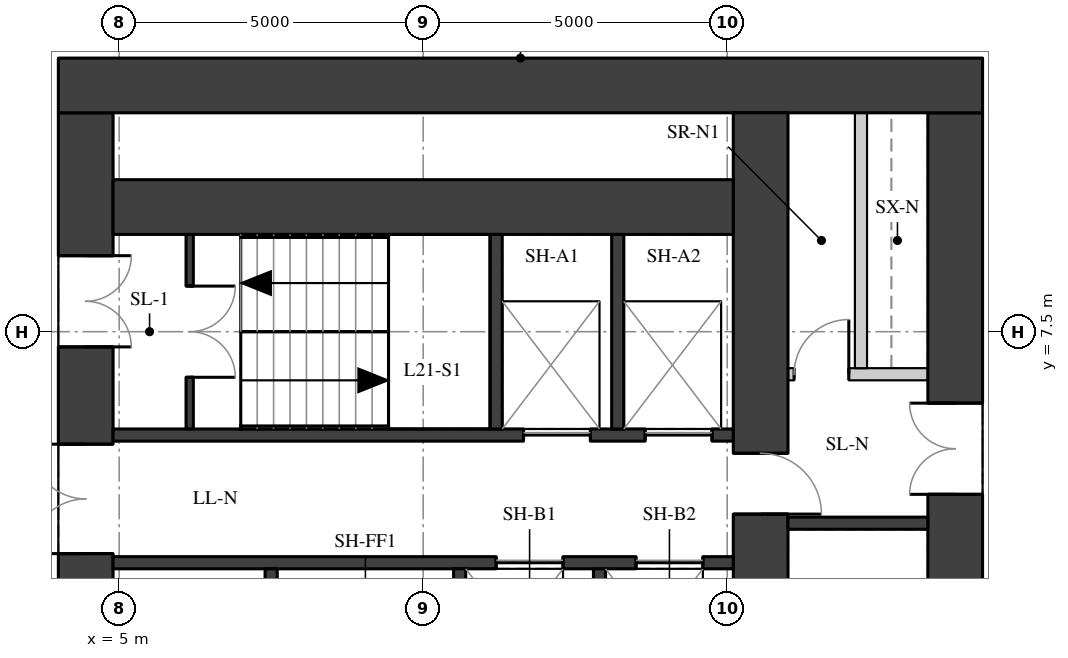
"""IFC4 building model, lengths in metres.
Left out: names, types, materials, properties, quantities, classifications, styles, units other than length and angle.
Written with IfcOpenShell. Run it as: python <this file> out.ifc"""

import sys

from ifc_helpers import new_model, si_unit, direction, frame, frame_2d, origin, place, context, subcontext, project, spatial, rectangle, extrude, element, fill, save


model = new_model("IFC4")
c1 = context("Model", 3, precision=1e-05, world=origin(), true_north=direction((0.0, 1.0)))
c2 = subcontext(c1, "Body", "Model", "MODEL_VIEW")
j1 = project(units=[si_unit("LENGTHUNIT", "METRE"), si_unit("PLANEANGLEUNIT", "RADIAN")], contexts=[c1])
p1 = place(None, origin())
s1 = spatial("IfcSite", under=j1, at=p1, CompositionType="ELEMENT")
p2 = place(p1, origin())
s2 = spatial("IfcBuilding", under=s1, at=p2, CompositionType="ELEMENT")
p3 = place(p2, frame((0.0, 0.0, 77.8)))
s3 = spatial("IfcBuildingStorey", under=s2, at=p3, CompositionType="ELEMENT", Elevation=77.8)
p4 = place(p3, frame((4.45, -11.1, 0.0), z_axis=(0.0, 0.0, 1.0), x_axis=(0.0, 1.0, 0.0)))
e1 = element("IfcWall", 1, at=p4, inside=s3, PredefinedType="SHEAR", context=c2, shape_type="SweptSolid", body=[
    extrude(rectangle(XDim=22.2, YDim=0.9, at=frame_2d((11.1, 0.0))), origin(), (0.0, 0.0, 1.0), 3.02),
])
p5 = place(p4, frame((2.35, 0.0, 0.0)))
e2 = element("IfcOpeningElement", 2, at=p5, cuts=e1, PredefinedType="OPENING", context=c2, shape_type="SweptSolid", body=[
    extrude(rectangle(XDim=1.5, YDim=2.1, at=frame_2d((0.75, 1.05))), frame((0.0, 0.46, 0.0), z_axis=(0.0, -1.0, 0.0), x_axis=(1.0, 0.0, 0.0)), (0.0, 0.0, 1.0), 0.92),
])
p6 = place(p4, frame((5.45, 0.0, 0.0)))
e3 = element("IfcOpeningElement", 3, at=p6, cuts=e1, PredefinedType="OPENING", context=c2, shape_type="SweptSolid", body=[
    extrude(rectangle(XDim=1.8, YDim=2.1, at=frame_2d((0.9, 1.05))), frame((0.0, 0.46, 0.0), z_axis=(0.0, -1.0, 0.0), x_axis=(1.0, 0.0, 0.0)), (0.0, 0.0, 1.0), 0.92),
])
p7 = place(p4, frame((7.95, 0.0, 0.0)))
e4 = element("IfcOpeningElement", 4, at=p7, cuts=e1, PredefinedType="OPENING", context=c2, shape_type="SweptSolid", body=[
    extrude(rectangle(XDim=1.1, YDim=2.1, at=frame_2d((0.55, 1.05))), frame((0.0, 0.46, 0.0), z_axis=(0.0, -1.0, 0.0), x_axis=(1.0, 0.0, 0.0)), (0.0, 0.0, 1.0), 0.92),
])
p8 = place(p4, frame((10.6, 0.0, 0.0)))
e5 = element("IfcOpeningElement", 5, at=p8, cuts=e1, PredefinedType="OPENING", context=c2, shape_type="SweptSolid", body=[
    extrude(rectangle(XDim=1.0, YDim=2.1, at=frame_2d((0.5, 1.05))), frame((0.0, 0.46, 0.0), z_axis=(0.0, -1.0, 0.0), x_axis=(1.0, 0.0, 0.0)), (0.0, 0.0, 1.0), 0.92),
])
p9 = place(p4, frame((13.15, 0.0, 0.0)))
e6 = element("IfcOpeningElement", 6, at=p9, cuts=e1, PredefinedType="OPENING", context=c2, shape_type="SweptSolid", body=[
    extrude(rectangle(XDim=1.1, YDim=2.1, at=frame_2d((0.55, 1.05))), frame((0.0, 0.46, 0.0), z_axis=(0.0, -1.0, 0.0), x_axis=(1.0, 0.0, 0.0)), (0.0, 0.0, 1.0), 0.92),
])
p10 = place(p4, frame((14.95, 0.0, 0.0)))
e7 = element("IfcOpeningElement", 7, at=p10, cuts=e1, PredefinedType="OPENING", context=c2, shape_type="SweptSolid", body=[
    extrude(rectangle(XDim=1.8, YDim=2.1, at=frame_2d((0.9, 1.05))), frame((0.0, 0.46, 0.0), z_axis=(0.0, -1.0, 0.0), x_axis=(1.0, 0.0, 0.0)), (0.0, 0.0, 1.0), 0.92),
])
p11 = place(p4, frame((18.35, 0.0, 0.0)))
e8 = element("IfcOpeningElement", 8, at=p11, cuts=e1, PredefinedType="OPENING", context=c2, shape_type="SweptSolid", body=[
    extrude(rectangle(XDim=1.5, YDim=2.1, at=frame_2d((0.75, 1.05))), frame((0.0, 0.46, 0.0), z_axis=(0.0, -1.0, 0.0), x_axis=(1.0, 0.0, 0.0)), (0.0, 0.0, 1.0), 0.92),
])
p12 = place(p3, frame((18.75, -11.1, 0.0), z_axis=(0.0, 0.0, 1.0), x_axis=(0.0, 1.0, 0.0)))
e9 = element("IfcWall", 9, at=p12, inside=s3, PredefinedType="SHEAR", context=c2, shape_type="SweptSolid", body=[
    extrude(rectangle(XDim=22.2, YDim=0.9, at=frame_2d((11.1, 0.0))), origin(), (0.0, 0.0, 1.0), 3.02),
])
p13 = place(p12, frame((15.925, 0.0, 0.0)))
e10 = element("IfcOpeningElement", 10, at=p13, cuts=e9, PredefinedType="OPENING", context=c2, shape_type="SweptSolid", body=[
    extrude(rectangle(XDim=1.5, YDim=2.1, at=frame_2d((0.75, 1.05))), frame((0.0, 0.46, 0.0), z_axis=(0.0, -1.0, 0.0), x_axis=(1.0, 0.0, 0.0)), (0.0, 0.0, 1.0), 0.92),
])
p14 = place(p12, frame((4.525, 0.0, 0.0)))
e11 = element("IfcOpeningElement", 11, at=p14, cuts=e9, PredefinedType="OPENING", context=c2, shape_type="SweptSolid", body=[
    extrude(rectangle(XDim=1.5, YDim=2.1, at=frame_2d((0.75, 1.05))), frame((0.0, 0.46, 0.0), z_axis=(0.0, -1.0, 0.0), x_axis=(1.0, 0.0, 0.0)), (0.0, 0.0, 1.0), 0.92),
])
p15 = place(p3, frame((4.0, 11.55, 0.0), z_axis=(0.0, 0.0, 1.0), x_axis=(1.0, 0.0, 0.0)))
e12 = element("IfcWall", 12, at=p15, inside=s3, PredefinedType="SHEAR", context=c2, shape_type="SweptSolid", body=[
    extrude(rectangle(XDim=15.2, YDim=0.9, at=frame_2d((7.6, 0.0))), origin(), (0.0, 0.0, 1.0), 3.02),
])
p16 = place(p3, frame((15.55, -11.1, 0.0), z_axis=(0.0, 0.0, 1.0), x_axis=(0.0, 1.0, 0.0)))
e13 = element("IfcWall", 13, at=p16, inside=s3, PredefinedType="SHEAR", context=c2, shape_type="SweptSolid", body=[
    extrude(rectangle(XDim=22.2, YDim=0.9, at=frame_2d((11.1, 0.0))), origin(), (0.0, 0.0, 1.0), 3.02),
])
p17 = place(p16, frame((15.6, 0.0, 0.0)))
e14 = element("IfcOpeningElement", 14, at=p17, cuts=e13, PredefinedType="OPENING", context=c2, shape_type="SweptSolid", body=[
    extrude(rectangle(XDim=1.0, YDim=2.1, at=frame_2d((0.5, 1.05))), frame((0.0, 0.46, 0.0), z_axis=(0.0, -1.0, 0.0), x_axis=(1.0, 0.0, 0.0)), (0.0, 0.0, 1.0), 0.92),
])
p18 = place(p16, frame((5.6, 0.0, 0.0)))
e15 = element("IfcOpeningElement", 15, at=p18, cuts=e13, PredefinedType="OPENING", context=c2, shape_type="SweptSolid", body=[
    extrude(rectangle(XDim=1.0, YDim=2.1, at=frame_2d((0.5, 1.05))), frame((0.0, 0.46, 0.0), z_axis=(0.0, -1.0, 0.0), x_axis=(1.0, 0.0, 0.0)), (0.0, 0.0, 1.0), 0.92),
])
p19 = place(p3, frame((4.9, 9.55, 0.0), z_axis=(0.0, 0.0, 1.0), x_axis=(1.0, 0.0, 0.0)))
e16 = element("IfcWall", 16, at=p19, inside=s3, PredefinedType="SHEAR", context=c2, shape_type="SweptSolid", body=[
    extrude(rectangle(XDim=10.2, YDim=0.9, at=frame_2d((5.1, 0.0))), origin(), (0.0, 0.0, 1.0), 3.02),
])
p20 = place(p3, frame((4.9, 5.8, 0.0), z_axis=(0.0, 0.0, 1.0), x_axis=(1.0, 0.0, 0.0)))
e17 = element("IfcWall", 17, at=p20, inside=s3, PredefinedType="SHEAR", context=c2, shape_type="SweptSolid", body=[
    extrude(rectangle(XDim=10.2, YDim=0.2, at=frame_2d((5.1, 0.0))), origin(), (0.0, 0.0, 1.0), 3.02),
])
p21 = place(p20, frame((6.75, 0.0, 0.0)))
e18 = element("IfcOpeningElement", 18, at=p21, cuts=e17, PredefinedType="OPENING", context=c2, shape_type="SweptSolid", body=[
    extrude(rectangle(XDim=1.1, YDim=2.1, at=frame_2d((0.55, 1.05))), frame((0.0, 0.11, 0.0), z_axis=(0.0, -1.0, 0.0), x_axis=(1.0, 0.0, 0.0)), (0.0, 0.0, 1.0), 0.22),
])
p22 = place(p20, frame((8.75, 0.0, 0.0)))
e19 = element("IfcOpeningElement", 19, at=p22, cuts=e17, PredefinedType="OPENING", context=c2, shape_type="SweptSolid", body=[
    extrude(rectangle(XDim=1.1, YDim=2.1, at=frame_2d((0.55, 1.05))), frame((0.0, 0.11, 0.0), z_axis=(0.0, -1.0, 0.0), x_axis=(1.0, 0.0, 0.0)), (0.0, 0.0, 1.0), 0.22),
])
p23 = place(p3, frame((4.9, 3.7, 0.0), z_axis=(0.0, 0.0, 1.0), x_axis=(1.0, 0.0, 0.0)))
e20 = element("IfcWall", 20, at=p23, inside=s3, PredefinedType="SHEAR", context=c2, shape_type="SweptSolid", body=[
    extrude(rectangle(XDim=10.2, YDim=0.2, at=frame_2d((5.1, 0.0))), origin(), (0.0, 0.0, 1.0), 3.02),
])
p24 = place(p23, frame((6.3, 0.0, 0.0)))
e21 = element("IfcOpeningElement", 21, at=p24, cuts=e20, PredefinedType="OPENING", context=c2, shape_type="SweptSolid", body=[
    extrude(rectangle(XDim=1.1, YDim=2.1, at=frame_2d((0.55, 1.05))), frame((0.0, 0.11, 0.0), z_axis=(0.0, -1.0, 0.0), x_axis=(1.0, 0.0, 0.0)), (0.0, 0.0, 1.0), 0.22),
])
p25 = place(p23, frame((8.6, 0.0, 0.0)))
e22 = element("IfcOpeningElement", 22, at=p25, cuts=e20, PredefinedType="OPENING", context=c2, shape_type="SweptSolid", body=[
    extrude(rectangle(XDim=1.1, YDim=2.1, at=frame_2d((0.55, 1.05))), frame((0.0, 0.11, 0.0), z_axis=(0.0, -1.0, 0.0), x_axis=(1.0, 0.0, 0.0)), (0.0, 0.0, 1.0), 0.22),
])
for number, where, z_axis, x_axis in (
    (23, (11.2, 5.9, 0.0), (0.0, 0.0, 1.0), (0.0, 1.0, 0.0)),
    (24, (13.2, 5.9, 0.0), (0.0, 0.0, 1.0), (0.0, 1.0, 0.0)),
):
    element("IfcWall", number, at=place(p3, frame(where, z_axis=z_axis, x_axis=x_axis)), inside=s3, PredefinedType="SHEAR", context=c2, shape_type="SweptSolid", body=[
        extrude(rectangle(XDim=3.2, YDim=0.2, at=frame_2d((1.6, 0.0))), origin(), (0.0, 0.0, 1.0), 3.02),
    ])
p26 = place(p3, frame((7.5, 1.1, 0.0), z_axis=(0.0, 0.0, 1.0), x_axis=(0.0, 1.0, 0.0)))
e25 = element("IfcWall", 25, at=p26, inside=s3, PredefinedType="SHEAR", context=c2, shape_type="SweptSolid", body=[
    extrude(rectangle(XDim=2.5, YDim=0.2, at=frame_2d((1.25, 0.0))), origin(), (0.0, 0.0, 1.0), 3.02),
])
p27 = place(p26, frame((0.7, 0.0, 0.0)))
e26 = element("IfcOpeningElement", 26, at=p27, cuts=e25, PredefinedType="OPENING", context=c2, shape_type="SweptSolid", body=[
    extrude(rectangle(XDim=1.1, YDim=2.1, at=frame_2d((0.55, 1.05))), frame((0.0, 0.11, 0.0), z_axis=(0.0, -1.0, 0.0), x_axis=(1.0, 0.0, 0.0)), (0.0, 0.0, 1.0), 0.22),
])
for number, where, z_axis, x_axis in (
    (27, (10.6, 1.1, 0.0), (0.0, 0.0, 1.0), (0.0, 1.0, 0.0)),
    (28, (12.9, 1.1, 0.0), (0.0, 0.0, 1.0), (0.0, 1.0, 0.0)),
):
    element("IfcWall", number, at=place(p3, frame(where, z_axis=z_axis, x_axis=x_axis)), inside=s3, PredefinedType="SHEAR", context=c2, shape_type="SweptSolid", body=[
        extrude(rectangle(XDim=2.5, YDim=0.2, at=frame_2d((1.25, 0.0))), origin(), (0.0, 0.0, 1.0), 3.02),
    ])
p28 = place(p3, frame((6.16, 5.9, 0.0), z_axis=(0.0, 0.0, 1.0), x_axis=(0.0, 1.0, 0.0)))
e29 = element("IfcWall", 29, at=p28, inside=s3, PredefinedType="SHEAR", context=c2, shape_type="SweptSolid", body=[
    extrude(rectangle(XDim=3.2, YDim=0.12, at=frame_2d((1.6, 0.0))), origin(), (0.0, 0.0, 1.0), 3.02),
])
p29 = place(p28, frame((0.85, 0.0, 0.0)))
e30 = element("IfcOpeningElement", 30, at=p29, cuts=e29, PredefinedType="OPENING", context=c2, shape_type="SweptSolid", body=[
    extrude(rectangle(XDim=1.5, YDim=2.1, at=frame_2d((0.75, 1.05))), frame((0.0, 0.07, 0.0), z_axis=(0.0, -1.0, 0.0), x_axis=(1.0, 0.0, 0.0)), (0.0, 0.0, 1.0), 0.14),
])
p30 = place(p3, frame((16.0, 4.35, 0.0), z_axis=(0.0, 0.0, 1.0), x_axis=(1.0, 0.0, 0.0)))
e31 = element("IfcWall", 31, at=p30, inside=s3, PredefinedType="SHEAR", context=c2, shape_type="SweptSolid", body=[
    extrude(rectangle(XDim=2.3, YDim=0.2, at=frame_2d((1.15, 0.0))), origin(), (0.0, 0.0, 1.0), 3.02),
])
p31 = place(p3, frame((16.0, 6.8, 0.0), z_axis=(0.0, 0.0, 1.0), x_axis=(1.0, 0.0, 0.0)))
e32 = element("IfcWall", 32, at=p31, inside=s3, PredefinedType="PARTITIONING", context=c2, shape_type="SweptSolid", body=[
    extrude(rectangle(XDim=2.3, YDim=0.2, at=frame_2d((1.15, 0.0))), origin(), (0.0, 0.0, 1.0), 3.02),
])
p32 = place(p31, frame((0.1, 0.0, 0.0)))
e33 = element("IfcOpeningElement", 33, at=p32, cuts=e32, PredefinedType="OPENING", context=c2, shape_type="SweptSolid", body=[
    extrude(rectangle(XDim=0.9, YDim=2.1, at=frame_2d((0.45, 1.05))), frame((0.0, 0.11, 0.0), z_axis=(0.0, -1.0, 0.0), x_axis=(1.0, 0.0, 0.0)), (0.0, 0.0, 1.0), 0.22),
])
p33 = place(p3, frame((17.2, 6.9, 0.0), z_axis=(0.0, 0.0, 1.0), x_axis=(0.0, 1.0, 0.0)))
e34 = element("IfcWall", 34, at=p33, inside=s3, PredefinedType="PARTITIONING", context=c2, shape_type="SweptSolid", body=[
    extrude(rectangle(XDim=4.2, YDim=0.2, at=frame_2d((2.1, 0.0))), origin(), (0.0, 0.0, 1.0), 3.02),
])
p34 = place(p10, origin())
e35 = element("IfcDoor", 35, at=p34, inside=s3, OperationType="DOUBLE_DOOR_SINGLE_SWING", PredefinedType="DOOR", context=c2, shape_type="SweptSolid", body=[
    extrude(rectangle(XDim=1.8, YDim=2.1, at=frame_2d((0.9, 1.05))), frame((0.0, 0.025, 0.0), z_axis=(0.0, -1.0, 0.0), x_axis=(1.0, 0.0, 0.0)), (0.0, 0.0, 1.0), 0.05),
])
fill(e7, e35)
p35 = place(p11, origin())
e36 = element("IfcDoor", 36, at=p35, inside=s3, OperationType="DOUBLE_DOOR_SINGLE_SWING", PredefinedType="DOOR", context=c2, shape_type="SweptSolid", body=[
    extrude(rectangle(XDim=1.5, YDim=2.1, at=frame_2d((0.75, 1.05))), frame((0.0, 0.025, 0.0), z_axis=(0.0, -1.0, 0.0), x_axis=(1.0, 0.0, 0.0)), (0.0, 0.0, 1.0), 0.05),
])
fill(e8, e36)
p36 = place(p13, origin())
e37 = element("IfcDoor", 37, at=p36, inside=s3, OperationType="DOUBLE_DOOR_SINGLE_SWING", PredefinedType="DOOR", context=c2, shape_type="SweptSolid", body=[
    extrude(rectangle(XDim=1.5, YDim=2.1, at=frame_2d((0.75, 1.05))), frame((0.0, 0.025, 0.0), z_axis=(0.0, -1.0, 0.0), x_axis=(1.0, 0.0, 0.0)), (0.0, 0.0, 1.0), 0.05),
])
fill(e10, e37)
p37 = place(p29, origin())
e38 = element("IfcDoor", 38, at=p37, inside=s3, OperationType="DOUBLE_DOOR_SINGLE_SWING", PredefinedType="DOOR", context=c2, shape_type="SweptSolid", body=[
    extrude(rectangle(XDim=1.5, YDim=2.1, at=frame_2d((0.75, 1.05))), frame((0.0, 0.025, 0.0), z_axis=(0.0, -1.0, 0.0), x_axis=(1.0, 0.0, 0.0)), (0.0, 0.0, 1.0), 0.05),
])
fill(e30, e38)
p38 = place(p21, origin())
e39 = element("IfcDoor", 39, at=p38, inside=s3, OperationType="DOUBLE_DOOR_SLIDING", PredefinedType="DOOR", context=c2, shape_type="SweptSolid", body=[
    extrude(rectangle(XDim=1.1, YDim=2.1, at=frame_2d((0.55, 1.05))), frame((0.0, 0.025, 0.0), z_axis=(0.0, -1.0, 0.0), x_axis=(1.0, 0.0, 0.0)), (0.0, 0.0, 1.0), 0.05),
])
fill(e18, e39)
p39 = place(p22, origin())
e40 = element("IfcDoor", 40, at=p39, inside=s3, OperationType="DOUBLE_DOOR_SLIDING", PredefinedType="DOOR", context=c2, shape_type="SweptSolid", body=[
    extrude(rectangle(XDim=1.1, YDim=2.1, at=frame_2d((0.55, 1.05))), frame((0.0, 0.025, 0.0), z_axis=(0.0, -1.0, 0.0), x_axis=(1.0, 0.0, 0.0)), (0.0, 0.0, 1.0), 0.05),
])
fill(e19, e40)
p40 = place(p24, origin())
e41 = element("IfcDoor", 41, at=p40, inside=s3, OperationType="DOUBLE_DOOR_SLIDING", PredefinedType="DOOR", context=c2, shape_type="SweptSolid", body=[
    extrude(rectangle(XDim=1.1, YDim=2.1, at=frame_2d((0.55, 1.05))), frame((0.0, 0.025, 0.0), z_axis=(0.0, -1.0, 0.0), x_axis=(1.0, 0.0, 0.0)), (0.0, 0.0, 1.0), 0.05),
])
fill(e21, e41)
p41 = place(p25, origin())
e42 = element("IfcDoor", 42, at=p41, inside=s3, OperationType="DOUBLE_DOOR_SLIDING", PredefinedType="DOOR", context=c2, shape_type="SweptSolid", body=[
    extrude(rectangle(XDim=1.1, YDim=2.1, at=frame_2d((0.55, 1.05))), frame((0.0, 0.025, 0.0), z_axis=(0.0, -1.0, 0.0), x_axis=(1.0, 0.0, 0.0)), (0.0, 0.0, 1.0), 0.05),
])
fill(e22, e42)
p42 = place(p17, origin())
e43 = element("IfcDoor", 43, at=p42, inside=s3, OperationType="SINGLE_SWING_RIGHT", PredefinedType="DOOR", context=c2, shape_type="SweptSolid", body=[
    extrude(rectangle(XDim=1.0, YDim=2.1, at=frame_2d((0.5, 1.05))), frame((0.0, 0.025, 0.0), z_axis=(0.0, -1.0, 0.0), x_axis=(1.0, 0.0, 0.0)), (0.0, 0.0, 1.0), 0.05),
])
fill(e14, e43)
p43 = place(p32, origin())
e44 = element("IfcDoor", 44, at=p43, inside=s3, OperationType="SINGLE_SWING_RIGHT", PredefinedType="DOOR", context=c2, shape_type="SweptSolid", body=[
    extrude(rectangle(XDim=0.9, YDim=2.1, at=frame_2d((0.45, 1.05))), frame((0.0, 0.025, 0.0), z_axis=(0.0, -1.0, 0.0), x_axis=(1.0, 0.0, 0.0)), (0.0, 0.0, 1.0), 0.05),
])
fill(e33, e44)
save(model, sys.argv[1])
